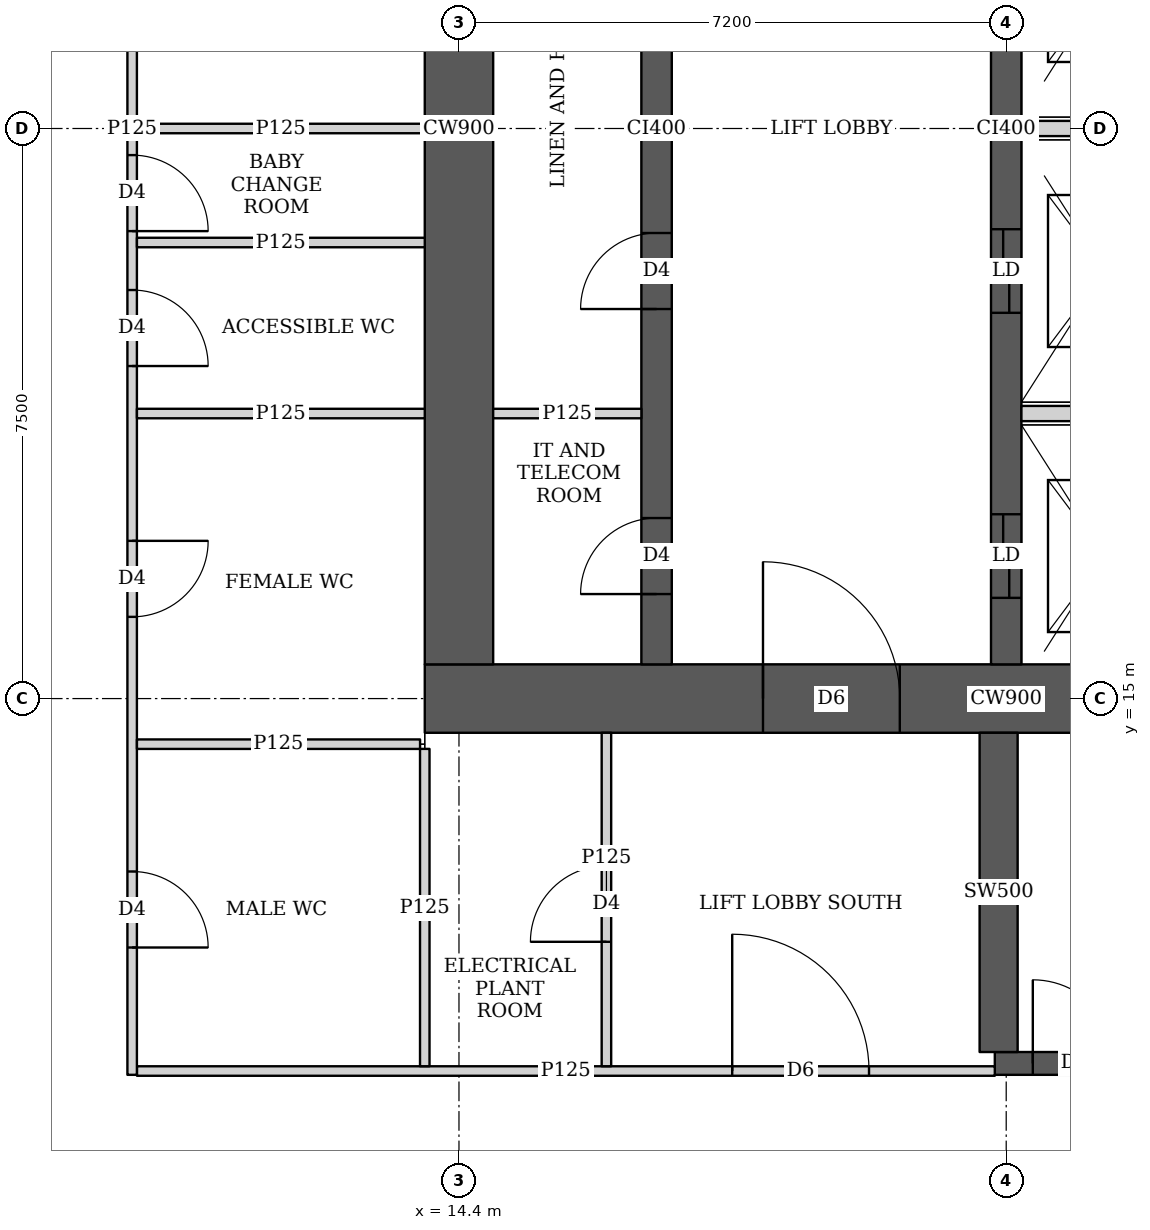
"""IFC4 building model, lengths in metres.
Left out: names, types, materials, properties, quantities, classifications, styles, units other than length and angle.
Written with IfcOpenShell. Run it as: python <this file> out.ifc"""

import sys

from ifc_helpers import new_model, si_unit, direction, frame, frame_2d, origin, place, context, subcontext, project, spatial, rectangle, extrude, element, fill, save


model = new_model("IFC4")
c1 = context("Model", 3, precision=1e-05, world=origin(), true_north=direction((0.0, 1.0)))
c2 = subcontext(c1, "Body", "Model", "MODEL_VIEW")
j1 = project(units=[si_unit("LENGTHUNIT", "METRE"), si_unit("PLANEANGLEUNIT", "RADIAN")], contexts=[c1])
p1 = place(None, origin())
s1 = spatial("IfcSite", under=j1, at=p1, CompositionType="ELEMENT")
p2 = place(p1, origin())
s2 = spatial("IfcBuilding", under=s1, at=p2, CompositionType="ELEMENT")
p3 = place(p2, frame((0.0, 0.0, 188.3)))
s3 = spatial("IfcBuildingStorey", under=s2, at=p3, CompositionType="ELEMENT", Elevation=188.3)
p4 = place(p3, frame((13.95, 15.0, 0.0), z_axis=(0.0, 0.0, 1.0), x_axis=(1.0, 0.0, 0.0)))
e1 = element("IfcWall", 1, at=p4, inside=s3, PredefinedType="SHEAR", context=c2, shape_type="SweptSolid", body=[
    extrude(rectangle(XDim=15.3, YDim=0.9, at=frame_2d((7.65, 0.0))), origin(), (0.0, 0.0, 1.0), 5.4),
])
p5 = place(p4, frame((4.45, 0.0, 0.0)))
e2 = element("IfcOpeningElement", 2, at=p5, cuts=e1, PredefinedType="OPENING", context=c2, shape_type="SweptSolid", body=[
    extrude(rectangle(XDim=1.8, YDim=2.1, at=frame_2d((0.9, 1.05))), frame((0.0, 0.46, 0.0), z_axis=(0.0, -1.0, 0.0), x_axis=(1.0, 0.0, 0.0)), (0.0, 0.0, 1.0), 0.92),
])
p6 = place(p4, frame((10.7, 0.0, 0.0)))
e3 = element("IfcOpeningElement", 3, at=p6, cuts=e1, PredefinedType="OPENING", context=c2, shape_type="SweptSolid", body=[
    extrude(rectangle(XDim=1.1, YDim=2.1, at=frame_2d((0.55, 1.05))), frame((0.0, 0.46, 0.0), z_axis=(0.0, -1.0, 0.0), x_axis=(1.0, 0.0, 0.0)), (0.0, 0.0, 1.0), 0.92),
])
p7 = place(p3, frame((14.4, 15.45, 0.0), z_axis=(0.0, 0.0, 1.0), x_axis=(0.0, 1.0, 0.0)))
e4 = element("IfcWall", 4, at=p7, inside=s3, PredefinedType="SHEAR", context=c2, shape_type="SweptSolid", body=[
    extrude(rectangle(XDim=14.1, YDim=0.9, at=frame_2d((7.05, 0.0))), origin(), (0.0, 0.0, 1.0), 5.4),
])
p8 = place(p3, frame((17.0, 15.45, 0.0), z_axis=(0.0, 0.0, 1.0), x_axis=(0.0, 1.0, 0.0)))
e5 = element("IfcWall", 5, at=p8, inside=s3, PredefinedType="SHEAR", context=c2, shape_type="SweptSolid", body=[
    extrude(rectangle(XDim=14.1, YDim=0.4, at=frame_2d((7.05, 0.0))), origin(), (0.0, 0.0, 1.0), 5.4),
])
p9 = place(p8, frame((0.925, 0.0, 0.0)))
e6 = element("IfcOpeningElement", 6, at=p9, cuts=e5, PredefinedType="OPENING", context=c2, shape_type="SweptSolid", body=[
    extrude(rectangle(XDim=1.0, YDim=2.1, at=frame_2d((0.5, 1.05))), frame((0.0, 0.21, 0.0), z_axis=(0.0, -1.0, 0.0), x_axis=(1.0, 0.0, 0.0)), (0.0, 0.0, 1.0), 0.42),
])
p10 = place(p8, frame((4.675, 0.0, 0.0)))
e7 = element("IfcOpeningElement", 7, at=p10, cuts=e5, PredefinedType="OPENING", context=c2, shape_type="SweptSolid", body=[
    extrude(rectangle(XDim=1.0, YDim=2.1, at=frame_2d((0.5, 1.05))), frame((0.0, 0.21, 0.0), z_axis=(0.0, -1.0, 0.0), x_axis=(1.0, 0.0, 0.0)), (0.0, 0.0, 1.0), 0.42),
])
p11 = place(p8, frame((8.425, 0.0, 0.0)))
e8 = element("IfcOpeningElement", 8, at=p11, cuts=e5, PredefinedType="OPENING", context=c2, shape_type="SweptSolid", body=[
    extrude(rectangle(XDim=1.0, YDim=2.1, at=frame_2d((0.5, 1.05))), frame((0.0, 0.21, 0.0), z_axis=(0.0, -1.0, 0.0), x_axis=(1.0, 0.0, 0.0)), (0.0, 0.0, 1.0), 0.42),
])
p12 = place(p8, frame((12.175, 0.0, 0.0)))
e9 = element("IfcOpeningElement", 9, at=p12, cuts=e5, PredefinedType="OPENING", context=c2, shape_type="SweptSolid", body=[
    extrude(rectangle(XDim=1.0, YDim=2.1, at=frame_2d((0.5, 1.05))), frame((0.0, 0.21, 0.0), z_axis=(0.0, -1.0, 0.0), x_axis=(1.0, 0.0, 0.0)), (0.0, 0.0, 1.0), 0.42),
])
p13 = place(p3, frame((21.6, 15.45, 0.0), z_axis=(0.0, 0.0, 1.0), x_axis=(0.0, 1.0, 0.0)))
e10 = element("IfcWall", 10, at=p13, inside=s3, PredefinedType="SHEAR", context=c2, shape_type="SweptSolid", body=[
    extrude(rectangle(XDim=14.1, YDim=0.4, at=frame_2d((7.05, 0.0))), origin(), (0.0, 0.0, 1.0), 5.4),
])
p14 = place(p13, frame((0.875, 0.0, 0.0)))
e11 = element("IfcOpeningElement", 11, at=p14, cuts=e10, PredefinedType="OPENING", context=c2, shape_type="SweptSolid", body=[
    extrude(rectangle(XDim=1.1, YDim=2.1, at=frame_2d((0.55, 1.05))), frame((0.0, 0.21, 0.0), z_axis=(0.0, -1.0, 0.0), x_axis=(1.0, 0.0, 0.0)), (0.0, 0.0, 1.0), 0.42),
])
p15 = place(p13, frame((4.625, 0.0, 0.0)))
e12 = element("IfcOpeningElement", 12, at=p15, cuts=e10, PredefinedType="OPENING", context=c2, shape_type="SweptSolid", body=[
    extrude(rectangle(XDim=1.1, YDim=2.1, at=frame_2d((0.55, 1.05))), frame((0.0, 0.21, 0.0), z_axis=(0.0, -1.0, 0.0), x_axis=(1.0, 0.0, 0.0)), (0.0, 0.0, 1.0), 0.42),
])
p16 = place(p13, frame((8.375, 0.0, 0.0)))
e13 = element("IfcOpeningElement", 13, at=p16, cuts=e10, PredefinedType="OPENING", context=c2, shape_type="SweptSolid", body=[
    extrude(rectangle(XDim=1.1, YDim=2.1, at=frame_2d((0.55, 1.05))), frame((0.0, 0.21, 0.0), z_axis=(0.0, -1.0, 0.0), x_axis=(1.0, 0.0, 0.0)), (0.0, 0.0, 1.0), 0.42),
])
p17 = place(p13, frame((12.125, 0.0, 0.0)))
e14 = element("IfcOpeningElement", 14, at=p17, cuts=e10, PredefinedType="OPENING", context=c2, shape_type="SweptSolid", body=[
    extrude(rectangle(XDim=1.1, YDim=2.1, at=frame_2d((0.55, 1.05))), frame((0.0, 0.21, 0.0), z_axis=(0.0, -1.0, 0.0), x_axis=(1.0, 0.0, 0.0)), (0.0, 0.0, 1.0), 0.42),
])
p18 = place(p3, frame((21.45, 10.2, 0.0), z_axis=(0.0, 0.0, 1.0), x_axis=(1.0, 0.0, 0.0)))
e15 = element("IfcWall", 15, at=p18, inside=s3, PredefinedType="SHEAR", context=c2, shape_type="SweptSolid", body=[
    extrude(rectangle(XDim=7.5, YDim=0.3, at=frame_2d((3.75, 0.0))), origin(), (0.0, 0.0, 1.0), 5.4),
])
p19 = place(p18, frame((0.5, 0.0, 0.0)))
e16 = element("IfcOpeningElement", 16, at=p19, cuts=e15, PredefinedType="OPENING", context=c2, shape_type="SweptSolid", body=[
    extrude(rectangle(XDim=1.1, YDim=2.1, at=frame_2d((0.55, 1.05))), frame((0.0, 0.16, 0.0), z_axis=(0.0, -1.0, 0.0), x_axis=(1.0, 0.0, 0.0)), (0.0, 0.0, 1.0), 0.32),
])
p20 = place(p3, frame((21.5, 10.35, 0.0), z_axis=(0.0, 0.0, 1.0), x_axis=(0.0, 1.0, 0.0)))
e17 = element("IfcWall", 17, at=p20, inside=s3, PredefinedType="SHEAR", context=c2, shape_type="SweptSolid", body=[
    extrude(rectangle(XDim=4.2, YDim=0.5, at=frame_2d((2.1, 0.0))), origin(), (0.0, 0.0, 1.0), 5.4),
])
p21 = place(p3, frame((10.1, 10.05, 0.0), z_axis=(0.0, 0.0, 1.0), x_axis=(0.0, 1.0, 0.0)))
e18 = element("IfcWall", 18, at=p21, inside=s3, PredefinedType="PARTITIONING", context=c2, shape_type="SweptSolid", body=[
    extrude(rectangle(XDim=24.9, YDim=0.125, at=frame_2d((12.45, 0.0))), origin(), (0.0, 0.0, 1.0), 3.55),
])
p22 = place(p21, frame((1.675, 0.0, 0.0)))
e19 = element("IfcOpeningElement", 19, at=p22, cuts=e18, PredefinedType="OPENING", context=c2, shape_type="SweptSolid", body=[
    extrude(rectangle(XDim=1.0, YDim=2.1, at=frame_2d((0.5, 1.05))), frame((0.0, 0.073, 0.0), z_axis=(0.0, -1.0, 0.0), x_axis=(1.0, 0.0, 0.0)), (0.0, 0.0, 1.0), 0.145),
])
p23 = place(p21, frame((16.0, 0.0, 0.0)))
e20 = element("IfcOpeningElement", 20, at=p23, cuts=e18, PredefinedType="OPENING", context=c2, shape_type="SweptSolid", body=[
    extrude(rectangle(XDim=1.0, YDim=2.1, at=frame_2d((0.5, 1.05))), frame((0.0, 0.073, 0.0), z_axis=(0.0, -1.0, 0.0), x_axis=(1.0, 0.0, 0.0)), (0.0, 0.0, 1.0), 0.145),
])
p24 = place(p21, frame((22.225, 0.0, 0.0)))
e21 = element("IfcOpeningElement", 21, at=p24, cuts=e18, PredefinedType="OPENING", context=c2, shape_type="SweptSolid", body=[
    extrude(rectangle(XDim=1.0, YDim=2.1, at=frame_2d((0.5, 1.05))), frame((0.0, 0.073, 0.0), z_axis=(0.0, -1.0, 0.0), x_axis=(1.0, 0.0, 0.0)), (0.0, 0.0, 1.0), 0.145),
])
p25 = place(p21, frame((6.025, 0.0, 0.0)))
e22 = element("IfcOpeningElement", 22, at=p25, cuts=e18, PredefinedType="OPENING", context=c2, shape_type="SweptSolid", body=[
    extrude(rectangle(XDim=1.0, YDim=2.1, at=frame_2d((0.5, 1.05))), frame((0.0, 0.073, 0.0), z_axis=(0.0, -1.0, 0.0), x_axis=(1.0, 0.0, 0.0)), (0.0, 0.0, 1.0), 0.145),
])
p26 = place(p21, frame((9.325, 0.0, 0.0)))
e23 = element("IfcOpeningElement", 23, at=p26, cuts=e18, PredefinedType="OPENING", context=c2, shape_type="SweptSolid", body=[
    extrude(rectangle(XDim=1.0, YDim=2.1, at=frame_2d((0.5, 1.05))), frame((0.0, 0.073, 0.0), z_axis=(0.0, -1.0, 0.0), x_axis=(1.0, 0.0, 0.0)), (0.0, 0.0, 1.0), 0.145),
])
p27 = place(p21, frame((11.1, 0.0, 0.0)))
e24 = element("IfcOpeningElement", 24, at=p27, cuts=e18, PredefinedType="OPENING", context=c2, shape_type="SweptSolid", body=[
    extrude(rectangle(XDim=1.0, YDim=2.1, at=frame_2d((0.5, 1.05))), frame((0.0, 0.073, 0.0), z_axis=(0.0, -1.0, 0.0), x_axis=(1.0, 0.0, 0.0)), (0.0, 0.0, 1.0), 0.145),
])
p28 = place(p3, frame((10.163, 14.4, 0.0), z_axis=(0.0, 0.0, 1.0), x_axis=(1.0, 0.0, 0.0)))
e25 = element("IfcWall", 25, at=p28, inside=s3, PredefinedType="PARTITIONING", context=c2, shape_type="SweptSolid", body=[
    extrude(rectangle(XDim=3.725, YDim=0.125, at=frame_2d((1.862, 0.0))), origin(), (0.0, 0.0, 1.0), 3.55),
])
p29 = place(p3, frame((10.163, 22.5, 0.0), z_axis=(0.0, 0.0, 1.0), x_axis=(1.0, 0.0, 0.0)))
e26 = element("IfcWall", 26, at=p29, inside=s3, PredefinedType="PARTITIONING", context=c2, shape_type="SweptSolid", body=[
    extrude(rectangle(XDim=3.787, YDim=0.125, at=frame_2d((1.894, 0.0))), origin(), (0.0, 0.0, 1.0), 3.55),
])
p30 = place(p3, frame((13.95, 10.163, 0.0), z_axis=(0.0, 0.0, 1.0), x_axis=(0.0, 1.0, 0.0)))
e27 = element("IfcWall", 27, at=p30, inside=s3, PredefinedType="PARTITIONING", context=c2, shape_type="SweptSolid", body=[
    extrude(rectangle(XDim=4.175, YDim=0.125, at=frame_2d((2.087, 0.0))), origin(), (0.0, 0.0, 1.0), 3.55),
])
p31 = place(p3, frame((10.163, 10.1, 0.0), z_axis=(0.0, 0.0, 1.0), x_axis=(1.0, 0.0, 0.0)))
e28 = element("IfcWall", 28, at=p31, inside=s3, PredefinedType="PARTITIONING", context=c2, shape_type="SweptSolid", body=[
    extrude(rectangle(XDim=11.287, YDim=0.125, at=frame_2d((5.644, 0.0))), origin(), (0.0, 0.0, 1.0), 3.15),
])
p32 = place(p31, frame((7.832, 0.0, 0.0)))
e29 = element("IfcOpeningElement", 29, at=p32, cuts=e28, PredefinedType="OPENING", context=c2, shape_type="SweptSolid", body=[
    extrude(rectangle(XDim=1.8, YDim=2.1, at=frame_2d((0.9, 1.05))), frame((0.0, 0.073, 0.0), z_axis=(0.0, -1.0, 0.0), x_axis=(1.0, 0.0, 0.0)), (0.0, 0.0, 1.0), 0.145),
])
p33 = place(p3, frame((16.34, 10.163, 0.0), z_axis=(0.0, 0.0, 1.0), x_axis=(0.0, 1.0, 0.0)))
e30 = element("IfcWall", 30, at=p33, inside=s3, PredefinedType="PARTITIONING", context=c2, shape_type="SweptSolid", body=[
    extrude(rectangle(XDim=4.387, YDim=0.125, at=frame_2d((2.193, 0.0))), origin(), (0.0, 0.0, 1.0), 5.15),
])
p34 = place(p33, frame((1.637, 0.0, 0.0)))
e31 = element("IfcOpeningElement", 31, at=p34, cuts=e30, PredefinedType="OPENING", context=c2, shape_type="SweptSolid", body=[
    extrude(rectangle(XDim=1.0, YDim=2.1, at=frame_2d((0.5, 1.05))), frame((0.0, 0.073, 0.0), z_axis=(0.0, -1.0, 0.0), x_axis=(1.0, 0.0, 0.0)), (0.0, 0.0, 1.0), 0.145),
])
for number, where, z_axis, x_axis in (
    (32, (10.163, 18.75, 0.0), (0.0, 0.0, 1.0), (1.0, 0.0, 0.0)),
    (33, (10.163, 21.0, 0.0), (0.0, 0.0, 1.0), (1.0, 0.0, 0.0)),
):
    element("IfcWall", number, at=place(p3, frame(where, z_axis=z_axis, x_axis=x_axis)), inside=s3, PredefinedType="PARTITIONING", context=c2, shape_type="SweptSolid", body=[
        extrude(rectangle(XDim=3.787, YDim=0.125, at=frame_2d((1.894, 0.0))), origin(), (0.0, 0.0, 1.0), 5.15),
    ])
p35 = place(p3, frame((14.85, 18.75, 0.0), z_axis=(0.0, 0.0, 1.0), x_axis=(1.0, 0.0, 0.0)))
e34 = element("IfcWall", 34, at=p35, inside=s3, PredefinedType="PARTITIONING", context=c2, shape_type="SweptSolid", body=[
    extrude(rectangle(XDim=1.95, YDim=0.125, at=frame_2d((0.975, 0.0))), origin(), (0.0, 0.0, 1.0), 5.15),
])
for number, where, z_axis, x_axis in (
    (35, (21.8, 18.75, 0.0), (0.0, 0.0, 1.0), (1.0, 0.0, 0.0)),
    (36, (21.8, 22.5, 0.0), (0.0, 0.0, 1.0), (1.0, 0.0, 0.0)),
):
    element("IfcWall", number, at=place(p3, frame(where, z_axis=z_axis, x_axis=x_axis)), inside=s3, PredefinedType="SOLIDWALL", context=c2, shape_type="SweptSolid", body=[
        extrude(rectangle(XDim=2.2, YDim=0.2, at=frame_2d((1.1, 0.0))), origin(), (0.0, 0.0, 1.0), 5.15),
    ])
p36 = place(p22, origin())
e37 = element("IfcDoor", 37, at=p36, inside=s3, OperationType="SINGLE_SWING_RIGHT", PredefinedType="DOOR", context=c2, shape_type="SweptSolid", body=[
    extrude(rectangle(XDim=1.0, YDim=2.1, at=frame_2d((0.5, 1.05))), frame((0.0, 0.025, 0.0), z_axis=(0.0, -1.0, 0.0), x_axis=(1.0, 0.0, 0.0)), (0.0, 0.0, 1.0), 0.05),
])
fill(e19, e37)
p37 = place(p34, origin())
e38 = element("IfcDoor", 38, at=p37, inside=s3, OperationType="SINGLE_SWING_LEFT", PredefinedType="DOOR", context=c2, shape_type="SweptSolid", body=[
    extrude(rectangle(XDim=1.0, YDim=2.1, at=frame_2d((0.5, 1.05))), frame((0.0, 0.025, 0.0), z_axis=(0.0, -1.0, 0.0), x_axis=(1.0, 0.0, 0.0)), (0.0, 0.0, 1.0), 0.05),
])
fill(e31, e38)
p38 = place(p32, origin())
e39 = element("IfcDoor", 39, at=p38, inside=s3, OperationType="DOUBLE_DOOR_SINGLE_SWING", PredefinedType="DOOR", context=c2, shape_type="SweptSolid", body=[
    extrude(rectangle(XDim=1.8, YDim=2.1, at=frame_2d((0.9, 1.05))), frame((0.0, 0.025, 0.0), z_axis=(0.0, -1.0, 0.0), x_axis=(1.0, 0.0, 0.0)), (0.0, 0.0, 1.0), 0.05),
])
fill(e29, e39)
p39 = place(p25, origin())
e40 = element("IfcDoor", 40, at=p39, inside=s3, OperationType="SINGLE_SWING_LEFT", PredefinedType="DOOR", context=c2, shape_type="SweptSolid", body=[
    extrude(rectangle(XDim=1.0, YDim=2.1, at=frame_2d((0.5, 1.05))), frame((0.0, 0.025, 0.0), z_axis=(0.0, -1.0, 0.0), x_axis=(1.0, 0.0, 0.0)), (0.0, 0.0, 1.0), 0.05),
])
fill(e22, e40)
p40 = place(p26, origin())
e41 = element("IfcDoor", 41, at=p40, inside=s3, OperationType="SINGLE_SWING_RIGHT", PredefinedType="DOOR", context=c2, shape_type="SweptSolid", body=[
    extrude(rectangle(XDim=1.0, YDim=2.1, at=frame_2d((0.5, 1.05))), frame((0.0, 0.025, 0.0), z_axis=(0.0, -1.0, 0.0), x_axis=(1.0, 0.0, 0.0)), (0.0, 0.0, 1.0), 0.05),
])
fill(e23, e41)
p41 = place(p27, origin())
e42 = element("IfcDoor", 42, at=p41, inside=s3, OperationType="SINGLE_SWING_RIGHT", PredefinedType="DOOR", context=c2, shape_type="SweptSolid", body=[
    extrude(rectangle(XDim=1.0, YDim=2.1, at=frame_2d((0.5, 1.05))), frame((0.0, 0.025, 0.0), z_axis=(0.0, -1.0, 0.0), x_axis=(1.0, 0.0, 0.0)), (0.0, 0.0, 1.0), 0.05),
])
fill(e24, e42)
p42 = place(p9, origin())
e43 = element("IfcDoor", 43, at=p42, inside=s3, OperationType="SINGLE_SWING_LEFT", PredefinedType="DOOR", context=c2, shape_type="SweptSolid", body=[
    extrude(rectangle(XDim=1.0, YDim=2.1, at=frame_2d((0.5, 1.05))), frame((0.0, 0.025, 0.0), z_axis=(0.0, -1.0, 0.0), x_axis=(1.0, 0.0, 0.0)), (0.0, 0.0, 1.0), 0.05),
])
fill(e6, e43)
p43 = place(p10, origin())
e44 = element("IfcDoor", 44, at=p43, inside=s3, OperationType="SINGLE_SWING_LEFT", PredefinedType="DOOR", context=c2, shape_type="SweptSolid", body=[
    extrude(rectangle(XDim=1.0, YDim=2.1, at=frame_2d((0.5, 1.05))), frame((0.0, 0.025, 0.0), z_axis=(0.0, -1.0, 0.0), x_axis=(1.0, 0.0, 0.0)), (0.0, 0.0, 1.0), 0.05),
])
fill(e7, e44)
p44 = place(p5, origin())
e45 = element("IfcDoor", 45, at=p44, inside=s3, OperationType="DOUBLE_DOOR_SINGLE_SWING", PredefinedType="DOOR", context=c2, shape_type="SweptSolid", body=[
    extrude(rectangle(XDim=1.8, YDim=2.1, at=frame_2d((0.9, 1.05))), frame((0.0, 0.025, 0.0), z_axis=(0.0, -1.0, 0.0), x_axis=(1.0, 0.0, 0.0)), (0.0, 0.0, 1.0), 0.05),
])
fill(e2, e45)
p45 = place(p14, origin())
e46 = element("IfcDoor", 46, at=p45, inside=s3, OperationType="DOUBLE_DOOR_SLIDING", PredefinedType="DOOR", context=c2, shape_type="SweptSolid", body=[
    extrude(rectangle(XDim=1.1, YDim=2.1, at=frame_2d((0.55, 1.05))), frame((0.0, 0.025, 0.0), z_axis=(0.0, -1.0, 0.0), x_axis=(1.0, 0.0, 0.0)), (0.0, 0.0, 1.0), 0.05),
])
fill(e11, e46)
p46 = place(p15, origin())
e47 = element("IfcDoor", 47, at=p46, inside=s3, OperationType="DOUBLE_DOOR_SLIDING", PredefinedType="DOOR", context=c2, shape_type="SweptSolid", body=[
    extrude(rectangle(XDim=1.1, YDim=2.1, at=frame_2d((0.55, 1.05))), frame((0.0, 0.025, 0.0), z_axis=(0.0, -1.0, 0.0), x_axis=(1.0, 0.0, 0.0)), (0.0, 0.0, 1.0), 0.05),
])
fill(e12, e47)
p47 = place(p19, origin())
e48 = element("IfcDoor", 48, at=p47, inside=s3, OperationType="SINGLE_SWING_LEFT", PredefinedType="DOOR", context=c2, shape_type="SweptSolid", body=[
    extrude(rectangle(XDim=1.1, YDim=2.1, at=frame_2d((0.55, 1.05))), frame((0.0, 0.025, 0.0), z_axis=(0.0, -1.0, 0.0), x_axis=(1.0, 0.0, 0.0)), (0.0, 0.0, 1.0), 0.05),
])
fill(e16, e48)
save(model, sys.argv[1])
